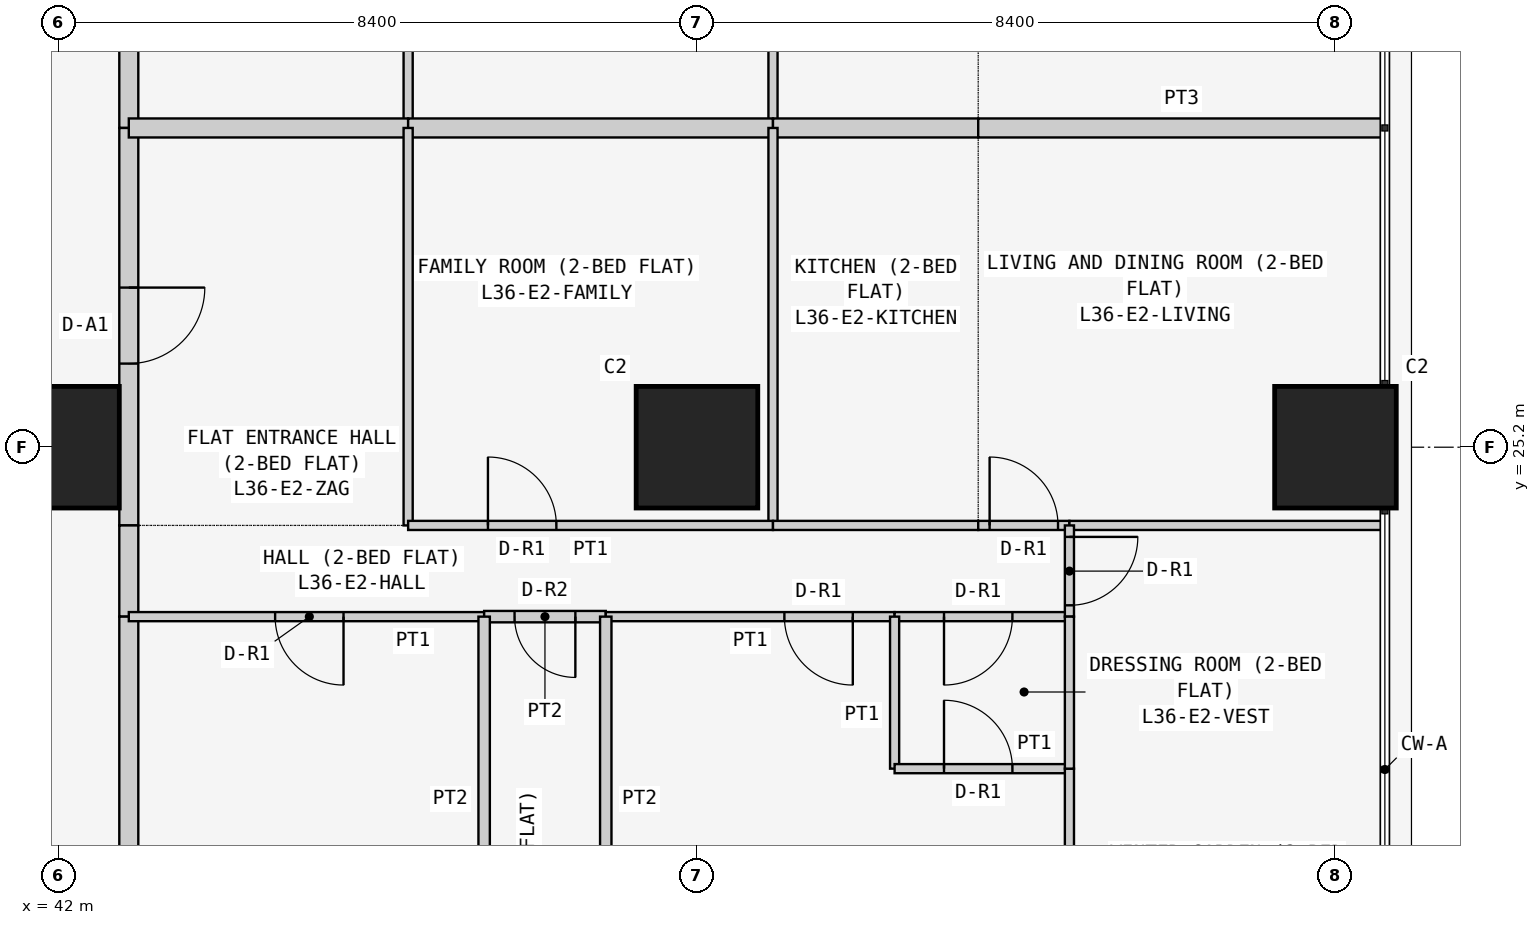
"""IFC4 building model, lengths in metres.
Left out: names, types, materials, properties, quantities, classifications, styles, units other than length and angle.
Written with IfcOpenShell. Run it as: python <this file> out.ifc"""

import sys

from ifc_helpers import new_model, si_unit, direction, frame, frame_2d, origin, origin_2d, place, context, subcontext, project, spatial, rectangle, extrude, element, fill, save


model = new_model("IFC4")
c1 = context("Model", 3, precision=1e-05, world=origin(), true_north=direction((0.0, 1.0)))
c2 = subcontext(c1, "Body", "Model", "MODEL_VIEW")
j1 = project(units=[si_unit("LENGTHUNIT", "METRE"), si_unit("PLANEANGLEUNIT", "RADIAN")], contexts=[c1])
p1 = place(None, origin())
s1 = spatial("IfcSite", under=j1, at=p1, CompositionType="ELEMENT")
p2 = place(p1, origin())
s2 = spatial("IfcBuilding", under=s1, at=p2, CompositionType="ELEMENT")
p3 = place(p2, frame((0.0, 0.0, 141.3)))
s3 = spatial("IfcBuildingStorey", under=s2, at=p3, CompositionType="ELEMENT", Elevation=141.3)
for number, where, z_axis, x_axis in (
    (1, (42.0, 25.2, 0.0), (0.0, 0.0, 1.0), (1.0, 0.0, 0.0)),
    (2, (50.4, 25.2, 0.0), (0.0, 0.0, 1.0), (1.0, 0.0, 0.0)),
    (3, (58.8, 25.2, 0.0), (0.0, 0.0, 1.0), (1.0, 0.0, 0.0)),
):
    element("IfcColumn", number, at=place(p3, frame(where, z_axis=z_axis, x_axis=x_axis)), inside=s3, PredefinedType="COLUMN", context=c2, shape_type="SweptSolid", body=[
        extrude(rectangle(XDim=1.6, YDim=1.6, at=origin_2d()), origin(), (0.0, 0.0, 1.0), 3.6),
    ])
p4 = place(p3, frame((42.925, 34.629, 0.0), z_axis=(0.0, 0.0, 1.0), x_axis=(0.0, -1.0, 0.0)))
e4 = element("IfcWall", 4, at=p4, inside=s3, PredefinedType="PARTITIONING", context=c2, shape_type="SweptSolid", body=[
    extrude(rectangle(XDim=5.229, YDim=0.25, at=frame_2d((2.615, 0.0))), origin(), (0.0, 0.0, 1.0), 3.45),
])
p5 = place(p4, frame((2.129, 0.0, 0.0)))
e5 = element("IfcOpeningElement", 5, at=p5, cuts=e4, PredefinedType="OPENING", context=c2, shape_type="SweptSolid", body=[
    extrude(rectangle(XDim=1.0, YDim=2.1, at=frame_2d((0.5, 1.05))), frame((0.0, 0.135, 0.0), z_axis=(0.0, -1.0, 0.0), x_axis=(1.0, 0.0, 0.0)), (0.0, 0.0, 1.0), 0.27),
])
p6 = place(p3, frame((42.925, 29.4, 0.0), z_axis=(0.0, 0.0, 1.0), x_axis=(0.0, -1.0, 0.0)))
e6 = element("IfcWall", 6, at=p6, inside=s3, PredefinedType="PARTITIONING", context=c2, shape_type="SweptSolid", body=[
    extrude(rectangle(XDim=5.229, YDim=0.25, at=frame_2d((2.615, 0.0))), origin(), (0.0, 0.0, 1.0), 3.45),
])
p7 = place(p6, frame((2.1, 0.0, 0.0)))
e7 = element("IfcOpeningElement", 7, at=p7, cuts=e6, PredefinedType="OPENING", context=c2, shape_type="SweptSolid", body=[
    extrude(rectangle(XDim=1.0, YDim=2.1, at=frame_2d((0.5, 1.05))), frame((0.0, 0.135, 0.0), z_axis=(0.0, -1.0, 0.0), x_axis=(1.0, 0.0, 0.0)), (0.0, 0.0, 1.0), 0.27),
])
p8 = place(p3, frame((42.925, 24.171, 0.0), z_axis=(0.0, 0.0, 1.0), x_axis=(0.0, -1.0, 0.0)))
e8 = element("IfcWall", 8, at=p8, inside=s3, PredefinedType="PARTITIONING", context=c2, shape_type="SweptSolid", body=[
    extrude(rectangle(XDim=1.2, YDim=0.25, at=frame_2d((0.6, 0.0))), origin(), (0.0, 0.0, 1.0), 3.45),
])
p9 = place(p3, frame((42.925, 22.971, 0.0), z_axis=(0.0, 0.0, 1.0), x_axis=(0.0, -1.0, 0.0)))
e9 = element("IfcWall", 9, at=p9, inside=s3, PredefinedType="PARTITIONING", context=c2, shape_type="SweptSolid", body=[
    extrude(rectangle(XDim=6.871, YDim=0.25, at=frame_2d((3.436, 0.0))), origin(), (0.0, 0.0, 1.0), 3.45),
])
p10 = place(p3, frame((46.6, 29.4, 0.0), z_axis=(0.0, 0.0, 1.0), x_axis=(0.0, 1.0, 0.0)))
e10 = element("IfcWall", 10, at=p10, inside=s3, PredefinedType="PARTITIONING", context=c2, shape_type="SweptSolid", body=[
    extrude(rectangle(XDim=5.229, YDim=0.12, at=frame_2d((2.615, 0.0))), origin(), (0.0, 0.0, 1.0), 3.45),
])
p11 = place(p3, frame((42.925, 29.4, 0.0), z_axis=(0.0, 0.0, 1.0), x_axis=(1.0, 0.0, 0.0)))
e11 = element("IfcWall", 11, at=p11, inside=s3, PredefinedType="PARTITIONING", context=c2, shape_type="SweptSolid", body=[
    extrude(rectangle(XDim=3.675, YDim=0.25, at=frame_2d((1.837, 0.0))), origin(), (0.0, 0.0, 1.0), 3.45),
])
p12 = place(p3, frame((51.4, 29.4, 0.0), z_axis=(0.0, 0.0, 1.0), x_axis=(0.0, 1.0, 0.0)))
e12 = element("IfcWall", 12, at=p12, inside=s3, PredefinedType="PARTITIONING", context=c2, shape_type="SweptSolid", body=[
    extrude(rectangle(XDim=5.229, YDim=0.12, at=frame_2d((2.615, 0.0))), origin(), (0.0, 0.0, 1.0), 3.45),
])
p13 = place(p3, frame((46.6, 29.4, 0.0), z_axis=(0.0, 0.0, 1.0), x_axis=(1.0, 0.0, 0.0)))
e13 = element("IfcWall", 13, at=p13, inside=s3, PredefinedType="PARTITIONING", context=c2, shape_type="SweptSolid", body=[
    extrude(rectangle(XDim=4.8, YDim=0.25, at=frame_2d((2.4, 0.0))), origin(), (0.0, 0.0, 1.0), 3.45),
])
p14 = place(p3, frame((51.4, 29.4, 0.0), z_axis=(0.0, 0.0, 1.0), x_axis=(1.0, 0.0, 0.0)))
e14 = element("IfcWall", 14, at=p14, inside=s3, PredefinedType="PARTITIONING", context=c2, shape_type="SweptSolid", body=[
    extrude(rectangle(XDim=2.7, YDim=0.25, at=frame_2d((1.35, 0.0))), origin(), (0.0, 0.0, 1.0), 3.45),
])
p15 = place(p3, frame((54.1, 29.4, 0.0), z_axis=(0.0, 0.0, 1.0), x_axis=(1.0, 0.0, 0.0)))
e15 = element("IfcWall", 15, at=p15, inside=s3, PredefinedType="PARTITIONING", context=c2, shape_type="SweptSolid", body=[
    extrude(rectangle(XDim=5.35, YDim=0.25, at=frame_2d((2.675, 0.0))), origin(), (0.0, 0.0, 1.0), 3.45),
])
for number, where, z_axis, x_axis in (
    (16, (46.6, 29.4, 0.0), (0.0, 0.0, 1.0), (0.0, -1.0, 0.0)),
    (17, (51.4, 29.4, 0.0), (0.0, 0.0, 1.0), (0.0, -1.0, 0.0)),
):
    element("IfcWall", number, at=place(p3, frame(where, z_axis=z_axis, x_axis=x_axis)), inside=s3, PredefinedType="PARTITIONING", context=c2, shape_type="SweptSolid", body=[
        extrude(rectangle(XDim=5.229, YDim=0.12, at=frame_2d((2.615, 0.0))), origin(), (0.0, 0.0, 1.0), 3.45),
    ])
p16 = place(p3, frame((51.4, 24.171, 0.0), z_axis=(0.0, 0.0, 1.0), x_axis=(-1.0, 0.0, 0.0)))
e18 = element("IfcWall", 18, at=p16, inside=s3, PredefinedType="PARTITIONING", context=c2, shape_type="SweptSolid", body=[
    extrude(rectangle(XDim=4.8, YDim=0.12, at=frame_2d((2.4, 0.0))), origin(), (0.0, 0.0, 1.0), 3.45),
])
p17 = place(p16, frame((2.85, 0.0, 0.0)))
e19 = element("IfcOpeningElement", 19, at=p17, cuts=e18, PredefinedType="OPENING", context=c2, shape_type="SweptSolid", body=[
    extrude(rectangle(XDim=0.9, YDim=2.1, at=frame_2d((0.45, 1.05))), frame((0.0, 0.07, 0.0), z_axis=(0.0, -1.0, 0.0), x_axis=(1.0, 0.0, 0.0)), (0.0, 0.0, 1.0), 0.14),
])
p18 = place(p3, frame((54.1, 24.171, 0.0), z_axis=(0.0, 0.0, 1.0), x_axis=(-1.0, 0.0, 0.0)))
e20 = element("IfcWall", 20, at=p18, inside=s3, PredefinedType="PARTITIONING", context=c2, shape_type="SweptSolid", body=[
    extrude(rectangle(XDim=2.7, YDim=0.12, at=frame_2d((1.35, 0.0))), origin(), (0.0, 0.0, 1.0), 3.45),
])
p19 = place(p3, frame((55.3, 24.171, 0.0), z_axis=(0.0, 0.0, 1.0), x_axis=(-1.0, 0.0, 0.0)))
e21 = element("IfcWall", 21, at=p19, inside=s3, PredefinedType="PARTITIONING", context=c2, shape_type="SweptSolid", body=[
    extrude(rectangle(XDim=1.2, YDim=0.12, at=frame_2d((0.6, 0.0))), origin(), (0.0, 0.0, 1.0), 3.45),
])
p20 = place(p19, frame((0.15, 0.0, 0.0)))
e22 = element("IfcOpeningElement", 22, at=p20, cuts=e21, PredefinedType="OPENING", context=c2, shape_type="SweptSolid", body=[
    extrude(rectangle(XDim=0.9, YDim=2.1, at=frame_2d((0.45, 1.05))), frame((0.0, 0.07, 0.0), z_axis=(0.0, -1.0, 0.0), x_axis=(1.0, 0.0, 0.0)), (0.0, 0.0, 1.0), 0.14),
])
p21 = place(p3, frame((59.45, 24.171, 0.0), z_axis=(0.0, 0.0, 1.0), x_axis=(-1.0, 0.0, 0.0)))
e23 = element("IfcWall", 23, at=p21, inside=s3, PredefinedType="PARTITIONING", context=c2, shape_type="SweptSolid", body=[
    extrude(rectangle(XDim=4.15, YDim=0.12, at=frame_2d((2.075, 0.0))), origin(), (0.0, 0.0, 1.0), 3.45),
])
p22 = place(p3, frame((47.6, 22.971, 0.0), z_axis=(0.0, 0.0, 1.0), x_axis=(-1.0, 0.0, 0.0)))
e24 = element("IfcWall", 24, at=p22, inside=s3, PredefinedType="PARTITIONING", context=c2, shape_type="SweptSolid", body=[
    extrude(rectangle(XDim=4.675, YDim=0.12, at=frame_2d((2.337, 0.0))), origin(), (0.0, 0.0, 1.0), 3.45),
])
p23 = place(p22, frame((1.85, 0.0, 0.0)))
e25 = element("IfcOpeningElement", 25, at=p23, cuts=e24, PredefinedType="OPENING", context=c2, shape_type="SweptSolid", body=[
    extrude(rectangle(XDim=0.9, YDim=2.1, at=frame_2d((0.45, 1.05))), frame((0.0, 0.07, 0.0), z_axis=(0.0, -1.0, 0.0), x_axis=(1.0, 0.0, 0.0)), (0.0, 0.0, 1.0), 0.14),
])
p24 = place(p3, frame((49.2, 22.971, 0.0), z_axis=(0.0, 0.0, 1.0), x_axis=(-1.0, 0.0, 0.0)))
e26 = element("IfcWall", 26, at=p24, inside=s3, PredefinedType="PARTITIONING", context=c2, shape_type="SweptSolid", body=[
    extrude(rectangle(XDim=1.6, YDim=0.15, at=frame_2d((0.8, 0.0))), origin(), (0.0, 0.0, 1.0), 3.45),
])
p25 = place(p24, frame((0.4, 0.0, 0.0)))
e27 = element("IfcOpeningElement", 27, at=p25, cuts=e26, PredefinedType="OPENING", context=c2, shape_type="SweptSolid", body=[
    extrude(rectangle(XDim=0.8, YDim=2.1, at=frame_2d((0.4, 1.05))), frame((0.0, 0.085, 0.0), z_axis=(0.0, -1.0, 0.0), x_axis=(1.0, 0.0, 0.0)), (0.0, 0.0, 1.0), 0.17),
])
p26 = place(p3, frame((53.0, 22.971, 0.0), z_axis=(0.0, 0.0, 1.0), x_axis=(-1.0, 0.0, 0.0)))
e28 = element("IfcWall", 28, at=p26, inside=s3, PredefinedType="PARTITIONING", context=c2, shape_type="SweptSolid", body=[
    extrude(rectangle(XDim=3.8, YDim=0.12, at=frame_2d((1.9, 0.0))), origin(), (0.0, 0.0, 1.0), 3.45),
])
p27 = place(p26, frame((0.55, 0.0, 0.0)))
e29 = element("IfcOpeningElement", 29, at=p27, cuts=e28, PredefinedType="OPENING", context=c2, shape_type="SweptSolid", body=[
    extrude(rectangle(XDim=0.9, YDim=2.1, at=frame_2d((0.45, 1.05))), frame((0.0, 0.07, 0.0), z_axis=(0.0, -1.0, 0.0), x_axis=(1.0, 0.0, 0.0)), (0.0, 0.0, 1.0), 0.14),
])
p28 = place(p3, frame((55.3, 22.971, 0.0), z_axis=(0.0, 0.0, 1.0), x_axis=(-1.0, 0.0, 0.0)))
e30 = element("IfcWall", 30, at=p28, inside=s3, PredefinedType="PARTITIONING", context=c2, shape_type="SweptSolid", body=[
    extrude(rectangle(XDim=2.3, YDim=0.12, at=frame_2d((1.15, 0.0))), origin(), (0.0, 0.0, 1.0), 3.45),
])
p29 = place(p28, frame((0.75, 0.0, 0.0)))
e31 = element("IfcOpeningElement", 31, at=p29, cuts=e30, PredefinedType="OPENING", context=c2, shape_type="SweptSolid", body=[
    extrude(rectangle(XDim=0.9, YDim=2.1, at=frame_2d((0.45, 1.05))), frame((0.0, 0.07, 0.0), z_axis=(0.0, -1.0, 0.0), x_axis=(1.0, 0.0, 0.0)), (0.0, 0.0, 1.0), 0.14),
])
p30 = place(p3, frame((55.3, 24.171, 0.0), z_axis=(0.0, 0.0, 1.0), x_axis=(0.0, -1.0, 0.0)))
e32 = element("IfcWall", 32, at=p30, inside=s3, PredefinedType="PARTITIONING", context=c2, shape_type="SweptSolid", body=[
    extrude(rectangle(XDim=1.2, YDim=0.12, at=frame_2d((0.6, 0.0))), origin(), (0.0, 0.0, 1.0), 3.45),
])
p31 = place(p30, frame((0.151, 0.0, 0.0)))
e33 = element("IfcOpeningElement", 33, at=p31, cuts=e32, PredefinedType="OPENING", context=c2, shape_type="SweptSolid", body=[
    extrude(rectangle(XDim=0.9, YDim=2.1, at=frame_2d((0.45, 1.05))), frame((0.0, 0.07, 0.0), z_axis=(0.0, -1.0, 0.0), x_axis=(1.0, 0.0, 0.0)), (0.0, 0.0, 1.0), 0.14),
])
for number, where, z_axis, x_axis in (
    (34, (47.6, 22.971, 0.0), (0.0, 0.0, 1.0), (0.0, -1.0, 0.0)),
    (35, (49.2, 22.971, 0.0), (0.0, 0.0, 1.0), (0.0, -1.0, 0.0)),
):
    element("IfcWall", number, at=place(p3, frame(where, z_axis=z_axis, x_axis=x_axis)), inside=s3, PredefinedType="PARTITIONING", context=c2, shape_type="SweptSolid", body=[
        extrude(rectangle(XDim=6.871, YDim=0.15, at=frame_2d((3.436, 0.0))), origin(), (0.0, 0.0, 1.0), 3.45),
    ])
p32 = place(p3, frame((53.0, 22.971, 0.0), z_axis=(0.0, 0.0, 1.0), x_axis=(0.0, -1.0, 0.0)))
e36 = element("IfcWall", 36, at=p32, inside=s3, PredefinedType="PARTITIONING", context=c2, shape_type="SweptSolid", body=[
    extrude(rectangle(XDim=2.0, YDim=0.12, at=frame_2d((1.0, 0.0))), origin(), (0.0, 0.0, 1.0), 3.45),
])
p33 = place(p3, frame((53.0, 20.971, 0.0), z_axis=(0.0, 0.0, 1.0), x_axis=(1.0, 0.0, 0.0)))
e37 = element("IfcWall", 37, at=p33, inside=s3, PredefinedType="PARTITIONING", context=c2, shape_type="SweptSolid", body=[
    extrude(rectangle(XDim=2.3, YDim=0.12, at=frame_2d((1.15, 0.0))), origin(), (0.0, 0.0, 1.0), 3.45),
])
p34 = place(p33, frame((0.65, 0.0, 0.0)))
e38 = element("IfcOpeningElement", 38, at=p34, cuts=e37, PredefinedType="OPENING", context=c2, shape_type="SweptSolid", body=[
    extrude(rectangle(XDim=0.9, YDim=2.1, at=frame_2d((0.45, 1.05))), frame((0.0, 0.07, 0.0), z_axis=(0.0, -1.0, 0.0), x_axis=(1.0, 0.0, 0.0)), (0.0, 0.0, 1.0), 0.14),
])
p35 = place(p3, frame((55.3, 20.971, 0.0), z_axis=(0.0, 0.0, 1.0), x_axis=(0.0, -1.0, 0.0)))
e39 = element("IfcWall", 39, at=p35, inside=s3, PredefinedType="PARTITIONING", context=c2, shape_type="SweptSolid", body=[
    extrude(rectangle(XDim=4.871, YDim=0.12, at=frame_2d((2.436, 0.0))), origin(), (0.0, 0.0, 1.0), 3.45),
])
p36 = place(p3, frame((55.3, 22.971, 0.0), z_axis=(0.0, 0.0, 1.0), x_axis=(0.0, -1.0, 0.0)))
e40 = element("IfcWall", 40, at=p36, inside=s3, PredefinedType="PARTITIONING", context=c2, shape_type="SweptSolid", body=[
    extrude(rectangle(XDim=2.0, YDim=0.12, at=frame_2d((1.0, 0.0))), origin(), (0.0, 0.0, 1.0), 3.45),
])
p37 = place(p7, origin())
e41 = element("IfcDoor", 41, at=p37, inside=s3, OperationType="SINGLE_SWING_LEFT", PredefinedType="DOOR", context=c2, shape_type="SweptSolid", body=[
    extrude(rectangle(XDim=1.0, YDim=2.1, at=frame_2d((0.5, 1.05))), frame((0.0, 0.025, 0.0), z_axis=(0.0, -1.0, 0.0), x_axis=(1.0, 0.0, 0.0)), (0.0, 0.0, 1.0), 0.05),
])
fill(e7, e41)
p38 = place(p17, frame((0.9, 0.0, 0.0), z_axis=(0.0, 0.0, 1.0), x_axis=(-1.0, 0.0, 0.0)))
e42 = element("IfcDoor", 42, at=p38, inside=s3, OperationType="SINGLE_SWING_LEFT", PredefinedType="DOOR", context=c2, shape_type="SweptSolid", body=[
    extrude(rectangle(XDim=0.9, YDim=2.1, at=frame_2d((0.45, 1.05))), frame((0.0, 0.025, 0.0), z_axis=(0.0, -1.0, 0.0), x_axis=(1.0, 0.0, 0.0)), (0.0, 0.0, 1.0), 0.05),
])
fill(e19, e42)
p39 = place(p20, frame((0.9, 0.0, 0.0), z_axis=(0.0, 0.0, 1.0), x_axis=(-1.0, 0.0, 0.0)))
e43 = element("IfcDoor", 43, at=p39, inside=s3, OperationType="SINGLE_SWING_LEFT", PredefinedType="DOOR", context=c2, shape_type="SweptSolid", body=[
    extrude(rectangle(XDim=0.9, YDim=2.1, at=frame_2d((0.45, 1.05))), frame((0.0, 0.025, 0.0), z_axis=(0.0, -1.0, 0.0), x_axis=(1.0, 0.0, 0.0)), (0.0, 0.0, 1.0), 0.05),
])
fill(e22, e43)
p40 = place(p23, origin())
e44 = element("IfcDoor", 44, at=p40, inside=s3, OperationType="SINGLE_SWING_LEFT", PredefinedType="DOOR", context=c2, shape_type="SweptSolid", body=[
    extrude(rectangle(XDim=0.9, YDim=2.1, at=frame_2d((0.45, 1.05))), frame((0.0, 0.025, 0.0), z_axis=(0.0, -1.0, 0.0), x_axis=(1.0, 0.0, 0.0)), (0.0, 0.0, 1.0), 0.05),
])
fill(e25, e44)
p41 = place(p25, origin())
e45 = element("IfcDoor", 45, at=p41, inside=s3, OperationType="SINGLE_SWING_LEFT", PredefinedType="DOOR", context=c2, shape_type="SweptSolid", body=[
    extrude(rectangle(XDim=0.8, YDim=2.1, at=frame_2d((0.4, 1.05))), frame((0.0, 0.025, 0.0), z_axis=(0.0, -1.0, 0.0), x_axis=(1.0, 0.0, 0.0)), (0.0, 0.0, 1.0), 0.05),
])
fill(e27, e45)
p42 = place(p27, origin())
e46 = element("IfcDoor", 46, at=p42, inside=s3, OperationType="SINGLE_SWING_LEFT", PredefinedType="DOOR", context=c2, shape_type="SweptSolid", body=[
    extrude(rectangle(XDim=0.9, YDim=2.1, at=frame_2d((0.45, 1.05))), frame((0.0, 0.025, 0.0), z_axis=(0.0, -1.0, 0.0), x_axis=(1.0, 0.0, 0.0)), (0.0, 0.0, 1.0), 0.05),
])
fill(e29, e46)
p43 = place(p29, origin())
e47 = element("IfcDoor", 47, at=p43, inside=s3, OperationType="SINGLE_SWING_RIGHT", PredefinedType="DOOR", context=c2, shape_type="SweptSolid", body=[
    extrude(rectangle(XDim=0.9, YDim=2.1, at=frame_2d((0.45, 1.05))), frame((0.0, 0.025, 0.0), z_axis=(0.0, -1.0, 0.0), x_axis=(1.0, 0.0, 0.0)), (0.0, 0.0, 1.0), 0.05),
])
fill(e31, e47)
p44 = place(p34, origin())
e48 = element("IfcDoor", 48, at=p44, inside=s3, OperationType="SINGLE_SWING_LEFT", PredefinedType="DOOR", context=c2, shape_type="SweptSolid", body=[
    extrude(rectangle(XDim=0.9, YDim=2.1, at=frame_2d((0.45, 1.05))), frame((0.0, 0.025, 0.0), z_axis=(0.0, -1.0, 0.0), x_axis=(1.0, 0.0, 0.0)), (0.0, 0.0, 1.0), 0.05),
])
fill(e38, e48)
p45 = place(p31, origin())
e49 = element("IfcDoor", 49, at=p45, inside=s3, OperationType="SINGLE_SWING_LEFT", PredefinedType="DOOR", context=c2, shape_type="SweptSolid", body=[
    extrude(rectangle(XDim=0.9, YDim=2.1, at=frame_2d((0.45, 1.05))), frame((0.0, 0.025, 0.0), z_axis=(0.0, -1.0, 0.0), x_axis=(1.0, 0.0, 0.0)), (0.0, 0.0, 1.0), 0.05),
])
fill(e33, e49)
save(model, sys.argv[1])
